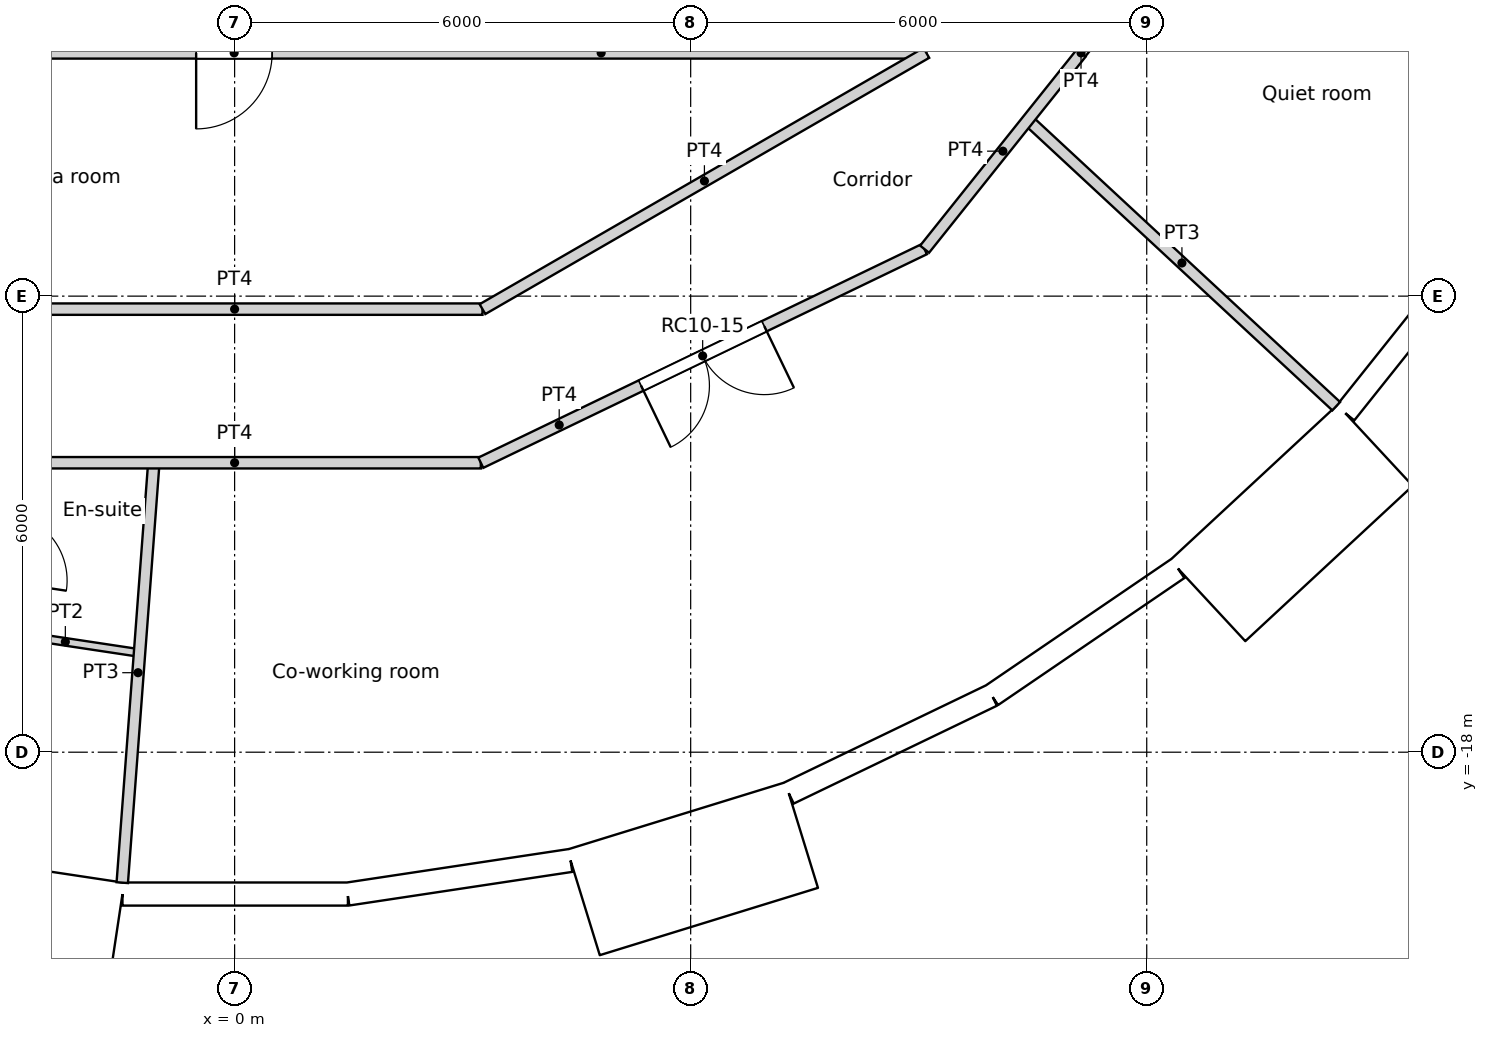
"""IFC4 building model, lengths in metres.
Left out: names, types, materials, properties, quantities, classifications, styles, units other than length and angle.
Written with IfcOpenShell. Run it as: python <this file> out.ifc"""

import sys

from ifc_helpers import new_model, si_unit, direction, frame, frame_2d, origin, origin_2d, place, context, subcontext, project, spatial, rectangle, circle, extrude, element, fill, save


model = new_model("IFC4")
c1 = context("Model", 3, precision=1e-05, world=origin(), true_north=direction((0.0, 1.0)))
c2 = subcontext(c1, "Body", "Model", "MODEL_VIEW")
j1 = project(units=[si_unit("LENGTHUNIT", "METRE"), si_unit("PLANEANGLEUNIT", "RADIAN")], contexts=[c1])
p1 = place(None, origin())
s1 = spatial("IfcSite", under=j1, at=p1, CompositionType="ELEMENT")
p2 = place(p1, origin())
s2 = spatial("IfcBuilding", under=s1, at=p2, CompositionType="ELEMENT")
p3 = place(p2, frame((0.0, 0.0, 323.4)))
s3 = spatial("IfcBuildingStorey", under=s2, at=p3, CompositionType="ELEMENT", Elevation=323.4)
for number, where, z_axis, x_axis in (
    (1, (1.406, -18.77, 0.0), (0.0, 0.0, 1.0), (1.0, 0.0, 0.0)),
    (2, (6.876, -17.521, 0.0), (0.0, 0.0, 1.0), (1.0, 0.0, 0.0)),
    (3, (11.735, -14.716, 0.0), (0.0, 0.0, 1.0), (1.0, 0.0, 0.0)),
    (4, (15.552, -10.603, 0.0), (0.0, 0.0, 1.0), (1.0, 0.0, 0.0)),
):
    element("IfcColumn", number, at=place(p3, frame(where, z_axis=z_axis, x_axis=x_axis)), inside=s3, PredefinedType="COLUMN", context=c2, shape_type="SweptSolid", body=[
        extrude(circle(Radius=0.45, at=origin_2d()), origin(), (0.0, 0.0, 1.0), 3.6),
    ])
p4 = place(p3, frame((-4.53, -19.989, -0.35), z_axis=(0.0, 0.0, 1.0), x_axis=(0.988836445254, -0.149004981587, 0.0)))
e5 = element("IfcWall", 5, at=p4, inside=s3, PredefinedType="ELEMENTEDWALL", context=c2, shape_type="SweptSolid", body=[
    extrude(rectangle(XDim=3.0, YDim=1.45, at=frame_2d((1.5, 0.0))), origin(), (0.0, 0.0, 1.0), 3.6),
])
p5 = place(p4, frame((1.5, 0.0, 1.9)))
e6 = element("IfcOpeningElement", 6, at=p5, cuts=e5, PredefinedType="OPENING", context=c2, shape_type="SweptSolid", body=[
    extrude(circle(Radius=0.9, at=origin_2d()), frame((0.0, 0.735, 0.0), z_axis=(0.0, -1.0, 0.0), x_axis=(1.0, 0.0, 0.0)), (0.0, 0.0, 1.0), 1.47),
])
p6 = place(p3, frame((-1.473, -19.866, 0.0), z_axis=(0.0, 0.0, 1.0), x_axis=(1.0, 0.0, 0.0)))
e7 = element("IfcWall", 7, at=p6, inside=s3, PredefinedType="SOLIDWALL", context=c2, shape_type="SweptSolid", body=[
    extrude(rectangle(XDim=2.962, YDim=0.3, at=frame_2d((1.481, 0.0))), origin(), (0.0, 0.0, 1.0), 3.25),
])
p7 = place(p6, frame((1.481, 0.0, 1.55)))
e8 = element("IfcOpeningElement", 8, at=p7, cuts=e7, PredefinedType="OPENING", context=c2, shape_type="SweptSolid", body=[
    extrude(circle(Radius=0.9, at=origin_2d()), frame((0.0, 0.16, 0.0), z_axis=(0.0, -1.0, 0.0), x_axis=(1.0, 0.0, 0.0)), (0.0, 0.0, 1.0), 0.32),
])
p8 = place(p3, frame((1.489, -19.866, 0.0), z_axis=(0.0, 0.0, 1.0), x_axis=(0.988835775663, 0.149009425104, 0.0)))
e9 = element("IfcWall", 9, at=p8, inside=s3, PredefinedType="SOLIDWALL", context=c2, shape_type="SweptSolid", body=[
    extrude(rectangle(XDim=2.962, YDim=0.3, at=frame_2d((1.481, 0.0))), origin(), (0.0, 0.0, 1.0), 3.25),
])
p9 = place(p8, frame((1.481, 0.0, 1.55)))
e10 = element("IfcOpeningElement", 10, at=p9, cuts=e9, PredefinedType="OPENING", context=c2, shape_type="SweptSolid", body=[
    extrude(circle(Radius=0.9, at=origin_2d()), frame((0.0, 0.16, 0.0), z_axis=(0.0, -1.0, 0.0), x_axis=(1.0, 0.0, 0.0)), (0.0, 0.0, 1.0), 0.32),
])
p10 = place(p3, frame((4.592, -19.975, -0.35), z_axis=(0.0, 0.0, 1.0), x_axis=(0.955571139978, 0.294760574774, 0.0)))
e11 = element("IfcWall", 11, at=p10, inside=s3, PredefinedType="ELEMENTEDWALL", context=c2, shape_type="SweptSolid", body=[
    extrude(rectangle(XDim=3.0, YDim=1.45, at=frame_2d((1.5, 0.0))), origin(), (0.0, 0.0, 1.0), 3.6),
])
p11 = place(p10, frame((1.5, 0.0, 1.9)))
e12 = element("IfcOpeningElement", 12, at=p11, cuts=e11, PredefinedType="OPENING", context=c2, shape_type="SweptSolid", body=[
    extrude(circle(Radius=0.9, at=origin_2d()), frame((0.0, 0.735, 0.0), z_axis=(0.0, -1.0, 0.0), x_axis=(1.0, 0.0, 0.0)), (0.0, 0.0, 1.0), 1.47),
])
p12 = place(p3, frame((7.292, -18.538, 0.0), z_axis=(0.0, 0.0, 1.0), x_axis=(0.90095513435, 0.433912255978, 0.0)))
e13 = element("IfcWall", 13, at=p12, inside=s3, PredefinedType="SOLIDWALL", context=c2, shape_type="SweptSolid", body=[
    extrude(rectangle(XDim=2.962, YDim=0.3, at=frame_2d((1.481, 0.0))), origin(), (0.0, 0.0, 1.0), 3.25),
])
p13 = place(p12, frame((1.481, 0.0, 1.55)))
e14 = element("IfcOpeningElement", 14, at=p13, cuts=e13, PredefinedType="OPENING", context=c2, shape_type="SweptSolid", body=[
    extrude(circle(Radius=0.9, at=origin_2d()), frame((0.0, 0.16, 0.0), z_axis=(0.0, -1.0, 0.0), x_axis=(1.0, 0.0, 0.0)), (0.0, 0.0, 1.0), 0.32),
])
p14 = place(p3, frame((9.961, -17.253, 0.0), z_axis=(0.0, 0.0, 1.0), x_axis=(0.826236061068, 0.563324037646, 0.0)))
e15 = element("IfcWall", 15, at=p14, inside=s3, PredefinedType="SOLIDWALL", context=c2, shape_type="SweptSolid", body=[
    extrude(rectangle(XDim=2.962, YDim=0.3, at=frame_2d((1.481, 0.0))), origin(), (0.0, 0.0, 1.0), 3.25),
])
p15 = place(p14, frame((1.481, 0.0, 1.55)))
e16 = element("IfcOpeningElement", 16, at=p15, cuts=e15, PredefinedType="OPENING", context=c2, shape_type="SweptSolid", body=[
    extrude(circle(Radius=0.9, at=origin_2d()), frame((0.0, 0.16, 0.0), z_axis=(0.0, -1.0, 0.0), x_axis=(1.0, 0.0, 0.0)), (0.0, 0.0, 1.0), 0.32),
])
p16 = place(p3, frame((12.804, -16.005, -0.35), z_axis=(0.0, 0.0, 1.0), x_axis=(0.733022439167, 0.680204457261, 0.0)))
e17 = element("IfcWall", 17, at=p16, inside=s3, PredefinedType="ELEMENTEDWALL", context=c2, shape_type="SweptSolid", body=[
    extrude(rectangle(XDim=3.0, YDim=1.45, at=frame_2d((1.5, 0.0))), origin(), (0.0, 0.0, 1.0), 3.6),
])
p17 = place(p16, frame((1.5, 0.0, 1.9)))
e18 = element("IfcOpeningElement", 18, at=p17, cuts=e17, PredefinedType="OPENING", context=c2, shape_type="SweptSolid", body=[
    extrude(circle(Radius=0.9, at=origin_2d()), frame((0.0, 0.735, 0.0), z_axis=(0.0, -1.0, 0.0), x_axis=(1.0, 0.0, 0.0)), (0.0, 0.0, 1.0), 1.47),
])
p18 = place(p3, frame((14.613, -13.538, 0.0), z_axis=(0.0, 0.0, 1.0), x_axis=(0.623498236992, 0.781824755599, 0.0)))
e19 = element("IfcWall", 19, at=p18, inside=s3, PredefinedType="SOLIDWALL", context=c2, shape_type="SweptSolid", body=[
    extrude(rectangle(XDim=2.962, YDim=0.3, at=frame_2d((1.481, 0.0))), origin(), (0.0, 0.0, 1.0), 3.25),
])
p19 = place(p18, frame((1.481, 0.0, 1.55)))
e20 = element("IfcOpeningElement", 20, at=p19, cuts=e19, PredefinedType="OPENING", context=c2, shape_type="SweptSolid", body=[
    extrude(circle(Radius=0.9, at=origin_2d()), frame((0.0, 0.16, 0.0), z_axis=(0.0, -1.0, 0.0), x_axis=(1.0, 0.0, 0.0)), (0.0, 0.0, 1.0), 0.32),
])
p20 = place(p3, frame((-9.103, -8.8, 0.0), z_axis=(0.0, 0.0, 1.0), x_axis=(1.0, 0.0, 0.0)))
e21 = element("IfcWall", 21, at=p20, inside=s3, PredefinedType="PARTITIONING", context=c2, shape_type="SweptSolid", body=[
    extrude(rectangle(XDim=18.204, YDim=0.15, at=frame_2d((9.102, 0.0))), origin(), (0.0, 0.0, 1.0), 3.25),
])
p21 = place(p20, frame((8.597, 0.0, 0.0)))
e22 = element("IfcOpeningElement", 22, at=p21, cuts=e21, PredefinedType="OPENING", context=c2, shape_type="SweptSolid", body=[
    extrude(rectangle(XDim=1.0, YDim=2.04, at=frame_2d((0.5, 1.02))), frame((0.0, 0.075, 0.0), z_axis=(0.0, -1.0, 0.0), x_axis=(1.0, 0.0, 0.0)), (0.0, 0.0, 1.0), 0.15),
])
p22 = place(p3, frame((9.078, -11.382, 0.0), z_axis=(0.0, 0.0, 1.0), x_axis=(0.624018330412, 0.781409702595, 0.0)))
e23 = element("IfcWall", 23, at=p22, inside=s3, PredefinedType="PARTITIONING", context=c2, shape_type="SweptSolid", body=[
    extrude(rectangle(XDim=3.301, YDim=0.15, at=frame_2d((1.65, 0.0))), origin(), (0.0, 0.0, 1.0), 3.25),
])
p23 = place(p3, frame((11.137, -8.8, 0.0), z_axis=(0.0, 0.0, 1.0), x_axis=(-1.0, 0.0, 0.0)))
e24 = element("IfcWall", 24, at=p23, inside=s3, PredefinedType="PARTITIONING", context=c2, shape_type="SweptSolid", body=[
    extrude(rectangle(XDim=0.003, YDim=0.15, at=frame_2d((0.001, 0.0))), origin(), (0.0, 0.0, 1.0), 3.25),
])
p24 = place(p3, frame((11.134, -8.8, 0.0), z_axis=(0.0, 0.0, 1.0), x_axis=(0.623476099415, 0.781842409606, 0.0)))
e25 = element("IfcWall", 25, at=p24, inside=s3, PredefinedType="PARTITIONING", context=c2, shape_type="SweptSolid", body=[
    extrude(rectangle(XDim=3.177, YDim=0.15, at=frame_2d((1.589, 0.0))), origin(), (0.0, 0.0, 1.0), 3.25),
])
p25 = place(p3, frame((-3.261, -12.171, 0.0), z_axis=(0.0, 0.0, 1.0), x_axis=(1.0, 0.0, 0.0)))
e26 = element("IfcWall", 26, at=p25, inside=s3, PredefinedType="PARTITIONING", context=c2, shape_type="SweptSolid", body=[
    extrude(rectangle(XDim=6.522, YDim=0.15, at=frame_2d((3.261, 0.0))), origin(), (0.0, 0.0, 1.0), 3.25),
])
p26 = place(p3, frame((3.261, -12.171, 0.0), z_axis=(0.0, 0.0, 1.0), x_axis=(0.866066809554, 0.499928276245, 0.0)))
e27 = element("IfcWall", 27, at=p26, inside=s3, PredefinedType="PARTITIONING", context=c2, shape_type="SweptSolid", body=[
    extrude(rectangle(XDim=6.743, YDim=0.15, at=frame_2d((3.371, 0.0))), origin(), (0.0, 0.0, 1.0), 3.25),
])
p27 = place(p3, frame((-3.239, -14.192, 0.0), z_axis=(0.0, 0.0, 1.0), x_axis=(1.0, 0.0, 0.0)))
e28 = element("IfcWall", 28, at=p27, inside=s3, PredefinedType="PARTITIONING", context=c2, shape_type="SweptSolid", body=[
    extrude(rectangle(XDim=6.478, YDim=0.15, at=frame_2d((3.239, 0.0))), origin(), (0.0, 0.0, 1.0), 3.25),
])
p28 = place(p3, frame((3.239, -14.192, 0.0), z_axis=(0.0, 0.0, 1.0), x_axis=(0.900976027191, 0.433868872388, 0.0)))
e29 = element("IfcWall", 29, at=p28, inside=s3, PredefinedType="PARTITIONING", context=c2, shape_type="SweptSolid", body=[
    extrude(rectangle(XDim=6.479, YDim=0.15, at=frame_2d((3.239, 0.0))), origin(), (0.0, 0.0, 1.0), 3.25),
])
p29 = place(p28, frame((2.34, 0.0, 0.0)))
e30 = element("IfcOpeningElement", 30, at=p29, cuts=e29, PredefinedType="OPENING", context=c2, shape_type="SweptSolid", body=[
    extrude(rectangle(XDim=1.8, YDim=2.1, at=frame_2d((0.9, 1.05))), frame((0.0, 0.075, 0.0), z_axis=(0.0, -1.0, 0.0), x_axis=(1.0, 0.0, 0.0)), (0.0, 0.0, 1.0), 0.15),
])
p30 = place(p3, frame((-3.203, -16.401, 0.0), z_axis=(0.0, 0.0, 1.0), x_axis=(0.988831780565, -0.149035934407, 0.0)))
e31 = element("IfcWall", 31, at=p30, inside=s3, PredefinedType="PARTITIONING", context=c2, shape_type="SweptSolid", body=[
    extrude(rectangle(XDim=1.974, YDim=0.1, at=frame_2d((0.987, 0.0))), origin(), (0.0, 0.0, 1.0), 3.25),
])
p31 = place(p3, frame((-1.478, -19.716, 0.0), z_axis=(0.0, 0.0, 1.0), x_axis=(0.074923617461, 0.997189275688, 0.0)))
e32 = element("IfcWall", 32, at=p31, inside=s3, PredefinedType="PARTITIONING", context=c2, shape_type="SweptSolid", body=[
    extrude(rectangle(XDim=5.54, YDim=0.15, at=frame_2d((2.77, 0.0))), origin(), (0.0, 0.0, 1.0), 3.25),
])
p32 = place(p3, frame((10.433, -9.68, 0.0), z_axis=(0.0, 0.0, 1.0), x_axis=(0.73295202722, -0.68028032883, 0.0)))
e33 = element("IfcWall", 33, at=p32, inside=s3, PredefinedType="PARTITIONING", context=c2, shape_type="SweptSolid", body=[
    extrude(rectangle(XDim=5.539, YDim=0.15, at=frame_2d((2.77, 0.0))), origin(), (0.0, 0.0, 1.0), 3.25),
])
p33 = place(p5, origin())
e34 = element("IfcWindow", 34, at=p33, inside=s3, PartitioningType="SINGLE_PANEL", PredefinedType="WINDOW", context=c2, shape_type="SweptSolid", body=[
    extrude(circle(Radius=0.9, at=origin_2d()), frame((0.0, 0.695, 0.0), z_axis=(0.0, -1.0, 0.0), x_axis=(1.0, 0.0, 0.0)), (0.0, 0.0, 1.0), 0.1),
])
fill(e6, e34)
p34 = place(p7, origin())
e35 = element("IfcWindow", 35, at=p34, inside=s3, PartitioningType="SINGLE_PANEL", PredefinedType="WINDOW", context=c2, shape_type="SweptSolid", body=[
    extrude(circle(Radius=0.9, at=origin_2d()), frame((0.0, 0.12, 0.0), z_axis=(0.0, -1.0, 0.0), x_axis=(1.0, 0.0, 0.0)), (0.0, 0.0, 1.0), 0.1),
])
fill(e8, e35)
p35 = place(p9, origin())
e36 = element("IfcWindow", 36, at=p35, inside=s3, PartitioningType="SINGLE_PANEL", PredefinedType="WINDOW", context=c2, shape_type="SweptSolid", body=[
    extrude(circle(Radius=0.9, at=origin_2d()), frame((0.0, 0.12, 0.0), z_axis=(0.0, -1.0, 0.0), x_axis=(1.0, 0.0, 0.0)), (0.0, 0.0, 1.0), 0.1),
])
fill(e10, e36)
p36 = place(p11, origin())
e37 = element("IfcWindow", 37, at=p36, inside=s3, PartitioningType="SINGLE_PANEL", PredefinedType="WINDOW", context=c2, shape_type="SweptSolid", body=[
    extrude(circle(Radius=0.9, at=origin_2d()), frame((0.0, 0.695, 0.0), z_axis=(0.0, -1.0, 0.0), x_axis=(1.0, 0.0, 0.0)), (0.0, 0.0, 1.0), 0.1),
])
fill(e12, e37)
p37 = place(p13, origin())
e38 = element("IfcWindow", 38, at=p37, inside=s3, PartitioningType="SINGLE_PANEL", PredefinedType="WINDOW", context=c2, shape_type="SweptSolid", body=[
    extrude(circle(Radius=0.9, at=origin_2d()), frame((0.0, 0.12, 0.0), z_axis=(0.0, -1.0, 0.0), x_axis=(1.0, 0.0, 0.0)), (0.0, 0.0, 1.0), 0.1),
])
fill(e14, e38)
p38 = place(p15, origin())
e39 = element("IfcWindow", 39, at=p38, inside=s3, PartitioningType="SINGLE_PANEL", PredefinedType="WINDOW", context=c2, shape_type="SweptSolid", body=[
    extrude(circle(Radius=0.9, at=origin_2d()), frame((0.0, 0.12, 0.0), z_axis=(0.0, -1.0, 0.0), x_axis=(1.0, 0.0, 0.0)), (0.0, 0.0, 1.0), 0.1),
])
fill(e16, e39)
p39 = place(p17, origin())
e40 = element("IfcWindow", 40, at=p39, inside=s3, PartitioningType="SINGLE_PANEL", PredefinedType="WINDOW", context=c2, shape_type="SweptSolid", body=[
    extrude(circle(Radius=0.9, at=origin_2d()), frame((0.0, 0.695, 0.0), z_axis=(0.0, -1.0, 0.0), x_axis=(1.0, 0.0, 0.0)), (0.0, 0.0, 1.0), 0.1),
])
fill(e18, e40)
p40 = place(p19, origin())
e41 = element("IfcWindow", 41, at=p40, inside=s3, PartitioningType="SINGLE_PANEL", PredefinedType="WINDOW", context=c2, shape_type="SweptSolid", body=[
    extrude(circle(Radius=0.9, at=origin_2d()), frame((0.0, 0.12, 0.0), z_axis=(0.0, -1.0, 0.0), x_axis=(1.0, 0.0, 0.0)), (0.0, 0.0, 1.0), 0.1),
])
fill(e20, e41)
p41 = place(p21, origin())
e42 = element("IfcDoor", 42, at=p41, inside=s3, OperationType="SINGLE_SWING_RIGHT", PredefinedType="DOOR", context=c2, shape_type="SweptSolid", body=[
    extrude(rectangle(XDim=1.0, YDim=2.04, at=frame_2d((0.5, 1.02))), frame((0.0, 0.025, 0.0), z_axis=(0.0, -1.0, 0.0), x_axis=(1.0, 0.0, 0.0)), (0.0, 0.0, 1.0), 0.05),
])
fill(e22, e42)
p42 = place(p29, origin())
e43 = element("IfcDoor", 43, at=p42, inside=s3, OperationType="DOUBLE_DOOR_SINGLE_SWING", PredefinedType="DOOR", context=c2, shape_type="SweptSolid", body=[
    extrude(rectangle(XDim=1.8, YDim=2.1, at=frame_2d((0.9, 1.05))), frame((0.0, 0.025, 0.0), z_axis=(0.0, -1.0, 0.0), x_axis=(1.0, 0.0, 0.0)), (0.0, 0.0, 1.0), 0.05),
])
fill(e30, e43)
save(model, sys.argv[1])
